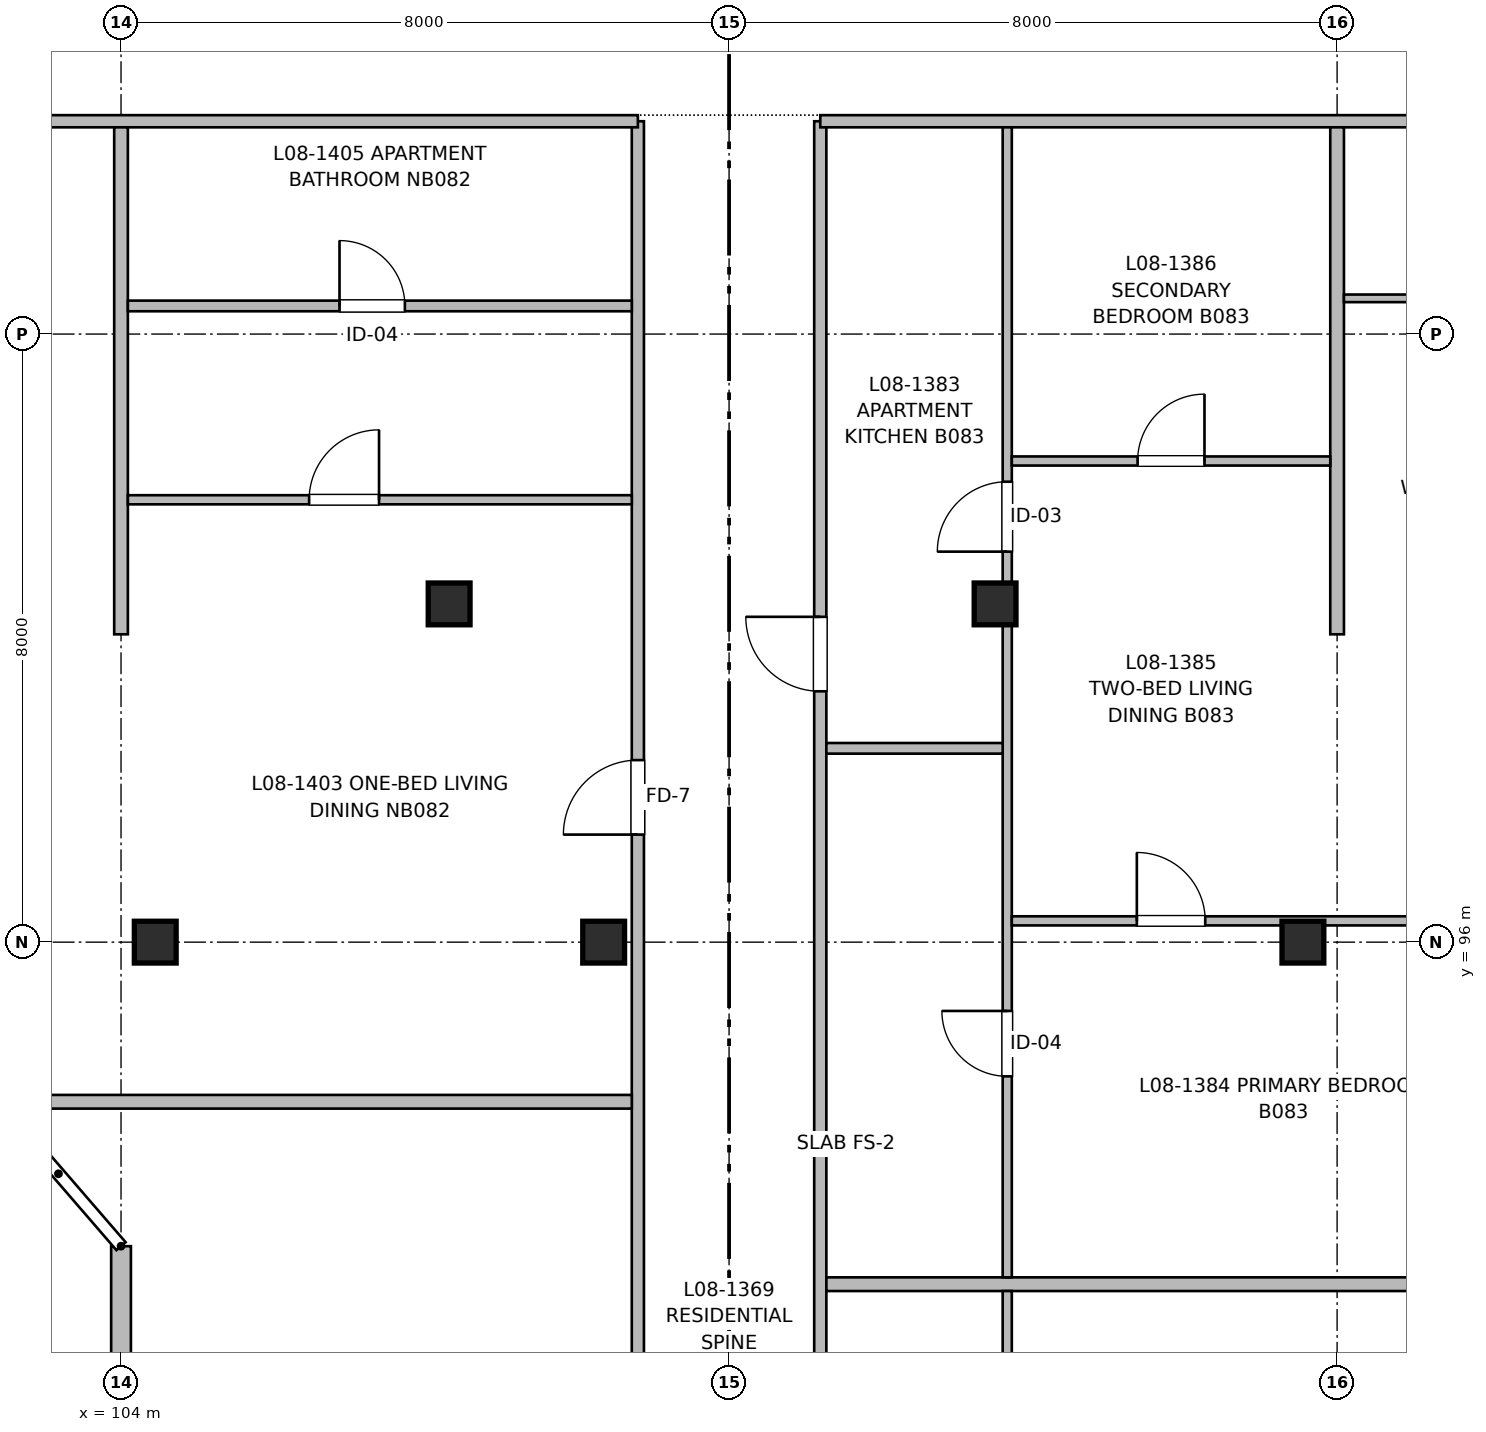
"""IFC4 building model, lengths in metres.
Left out: names, types, materials, properties, quantities, classifications, styles, units other than length and angle.
Written with IfcOpenShell. Run it as: python <this file> out.ifc"""

import sys

from ifc_helpers import new_model, si_unit, direction, frame, frame_2d, origin, origin_2d, place, context, subcontext, project, spatial, rectangle, extrude, element, fill, save


model = new_model("IFC4")
c1 = context("Model", 3, precision=1e-05, world=origin(), true_north=direction((0.0, 1.0)))
c2 = subcontext(c1, "Body", "Model", "MODEL_VIEW")
j1 = project(units=[si_unit("LENGTHUNIT", "METRE"), si_unit("PLANEANGLEUNIT", "RADIAN")], contexts=[c1])
p1 = place(None, origin())
s1 = spatial("IfcSite", under=j1, at=p1, CompositionType="ELEMENT")
p2 = place(p1, origin())
s2 = spatial("IfcBuilding", under=s1, at=p2, CompositionType="ELEMENT")
p3 = place(p2, frame((0.0, 0.0, 26.56)))
s3 = spatial("IfcBuildingStorey", under=s2, at=p3, CompositionType="ELEMENT", Elevation=26.56)
for number, where, z_axis, x_axis in (
    (1, (104.45, 96.0, 0.0), (0.0, 0.0, 1.0), (1.0, 0.0, 0.0)),
    (2, (108.317, 100.45, 0.0), (0.0, 0.0, 1.0), (1.0, 0.0, 0.0)),
    (3, (110.35, 96.0, 0.0), (0.0, 0.0, 1.0), (1.0, 0.0, 0.0)),
    (4, (115.5, 100.45, 0.0), (0.0, 0.0, 1.0), (1.0, 0.0, 0.0)),
    (5, (119.55, 96.0, 0.0), (0.0, 0.0, 1.0), (1.0, 0.0, 0.0)),
):
    element("IfcColumn", number, at=place(p3, frame(where, z_axis=z_axis, x_axis=x_axis)), inside=s3, PredefinedType="COLUMN", context=c2, shape_type="SweptSolid", body=[
        extrude(rectangle(XDim=0.55, YDim=0.55, at=origin_2d()), origin(), (0.0, 0.0, 1.0), 3.2),
    ])
p4 = place(p3, frame((104.0, 59.0, 0.0), z_axis=(0.0, 0.0, 1.0), x_axis=(0.0, 1.0, 0.0)))
e6 = element("IfcWall", 6, at=p4, inside=s3, PredefinedType="SOLIDWALL", context=c2, shape_type="SweptSolid", body=[
    extrude(rectangle(XDim=33.0, YDim=0.26, at=frame_2d((16.5, 0.0))), origin(), (0.0, 0.0, 1.0), 2.98),
])
p5 = place(p4, frame((3.125, 0.0, 0.0)))
e7 = element("IfcOpeningElement", 7, at=p5, cuts=e6, PredefinedType="OPENING", context=c2, shape_type="SweptSolid", body=[
    extrude(rectangle(XDim=1.2, YDim=2.2, at=frame_2d((0.6, 1.1))), frame((0.0, 0.14, 0.0), z_axis=(0.0, -1.0, 0.0), x_axis=(1.0, 0.0, 0.0)), (0.0, 0.0, 1.0), 0.28),
])
p6 = place(p4, frame((5.425, 0.0, 0.62)))
e8 = element("IfcOpeningElement", 8, at=p6, cuts=e6, PredefinedType="OPENING", context=c2, shape_type="SweptSolid", body=[
    extrude(rectangle(XDim=1.1, YDim=1.6, at=frame_2d((0.55, 0.8))), frame((0.0, 0.14, 0.0), z_axis=(0.0, -1.0, 0.0), x_axis=(1.0, 0.0, 0.0)), (0.0, 0.0, 1.0), 0.28),
])
p7 = place(p4, frame((11.175, 0.0, 0.72)))
e9 = element("IfcOpeningElement", 9, at=p7, cuts=e6, PredefinedType="OPENING", context=c2, shape_type="SweptSolid", body=[
    extrude(rectangle(XDim=2.4, YDim=1.5, at=frame_2d((1.2, 0.75))), frame((0.0, 0.14, 0.0), z_axis=(0.0, -1.0, 0.0), x_axis=(1.0, 0.0, 0.0)), (0.0, 0.0, 1.0), 0.28),
])
p8 = place(p4, frame((19.025, 0.0, 0.82)))
e10 = element("IfcOpeningElement", 10, at=p8, cuts=e6, PredefinedType="OPENING", context=c2, shape_type="SweptSolid", body=[
    extrude(rectangle(XDim=1.5, YDim=1.4, at=frame_2d((0.75, 0.7))), frame((0.0, 0.14, 0.0), z_axis=(0.0, -1.0, 0.0), x_axis=(1.0, 0.0, 0.0)), (0.0, 0.0, 1.0), 0.28),
])
p9 = place(p4, frame((28.1, 0.0, 0.82)))
e11 = element("IfcOpeningElement", 11, at=p9, cuts=e6, PredefinedType="OPENING", context=c2, shape_type="SweptSolid", body=[
    extrude(rectangle(XDim=1.55, YDim=1.4, at=frame_2d((0.775, 0.7))), frame((0.0, 0.14, 0.0), z_axis=(0.0, -1.0, 0.0), x_axis=(1.0, 0.0, 0.0)), (0.0, 0.0, 1.0), 0.28),
])
p10 = place(p3, frame((110.8, 59.16, 0.0), z_axis=(0.0, 0.0, 1.0), x_axis=(0.0, 1.0, 0.0)))
e12 = element("IfcWall", 12, at=p10, inside=s3, PredefinedType="PARTITIONING", context=c2, shape_type="SweptSolid", body=[
    extrude(rectangle(XDim=47.64, YDim=0.16, at=frame_2d((23.82, 0.0))), origin(), (0.0, 0.0, 1.0), 2.935),
])
p11 = place(p10, frame((9.84, 0.0, 0.0)))
e13 = element("IfcOpeningElement", 13, at=p11, cuts=e12, PredefinedType="OPENING", context=c2, shape_type="SweptSolid", body=[
    extrude(rectangle(XDim=1.1, YDim=2.15, at=frame_2d((0.55, 1.075))), frame((0.0, 0.09, 0.0), z_axis=(0.0, -1.0, 0.0), x_axis=(1.0, 0.0, 0.0)), (0.0, 0.0, 1.0), 0.18),
])
p12 = place(p10, frame((16.24, 0.0, 0.0)))
e14 = element("IfcOpeningElement", 14, at=p12, cuts=e12, PredefinedType="OPENING", context=c2, shape_type="SweptSolid", body=[
    extrude(rectangle(XDim=1.6, YDim=2.15, at=frame_2d((0.8, 1.075))), frame((0.0, 0.09, 0.0), z_axis=(0.0, -1.0, 0.0), x_axis=(1.0, 0.0, 0.0)), (0.0, 0.0, 1.0), 0.18),
])
p13 = place(p10, frame((1.8, 0.0, 0.0)))
e15 = element("IfcOpeningElement", 15, at=p13, cuts=e12, PredefinedType="OPENING", context=c2, shape_type="SweptSolid", body=[
    extrude(rectangle(XDim=0.96, YDim=2.15, at=frame_2d((0.48, 1.075))), frame((0.0, 0.09, 0.0), z_axis=(0.0, -1.0, 0.0), x_axis=(1.0, 0.0, 0.0)), (0.0, 0.0, 1.0), 0.18),
])
p14 = place(p10, frame((29.645, 0.0, 0.0)))
e16 = element("IfcOpeningElement", 16, at=p14, cuts=e12, PredefinedType="OPENING", context=c2, shape_type="SweptSolid", body=[
    extrude(rectangle(XDim=0.98, YDim=2.15, at=frame_2d((0.49, 1.075))), frame((0.0, 0.09, 0.0), z_axis=(0.0, -1.0, 0.0), x_axis=(1.0, 0.0, 0.0)), (0.0, 0.0, 1.0), 0.18),
])
p15 = place(p10, frame((38.255, 0.0, 0.0)))
e17 = element("IfcOpeningElement", 17, at=p15, cuts=e12, PredefinedType="OPENING", context=c2, shape_type="SweptSolid", body=[
    extrude(rectangle(XDim=0.98, YDim=2.15, at=frame_2d((0.49, 1.075))), frame((0.0, 0.09, 0.0), z_axis=(0.0, -1.0, 0.0), x_axis=(1.0, 0.0, 0.0)), (0.0, 0.0, 1.0), 0.18),
])
p16 = place(p3, frame((113.2, 59.16, 0.0), z_axis=(0.0, 0.0, 1.0), x_axis=(0.0, 1.0, 0.0)))
e18 = element("IfcWall", 18, at=p16, inside=s3, PredefinedType="PARTITIONING", context=c2, shape_type="SweptSolid", body=[
    extrude(rectangle(XDim=47.64, YDim=0.16, at=frame_2d((23.82, 0.0))), origin(), (0.0, 0.0, 1.0), 2.935),
])
p17 = place(p16, frame((8.15, 0.0, 0.0)))
e19 = element("IfcOpeningElement", 19, at=p17, cuts=e18, PredefinedType="OPENING", context=c2, shape_type="SweptSolid", body=[
    extrude(rectangle(XDim=0.98, YDim=2.15, at=frame_2d((0.49, 1.075))), frame((0.0, 0.09, 0.0), z_axis=(0.0, -1.0, 0.0), x_axis=(1.0, 0.0, 0.0)), (0.0, 0.0, 1.0), 0.18),
])
p18 = place(p16, frame((24.37, 0.0, 0.0)))
e20 = element("IfcOpeningElement", 20, at=p18, cuts=e18, PredefinedType="OPENING", context=c2, shape_type="SweptSolid", body=[
    extrude(rectangle(XDim=0.98, YDim=2.15, at=frame_2d((0.49, 1.075))), frame((0.0, 0.09, 0.0), z_axis=(0.0, -1.0, 0.0), x_axis=(1.0, 0.0, 0.0)), (0.0, 0.0, 1.0), 0.18),
])
p19 = place(p16, frame((40.14, 0.0, 0.0)))
e21 = element("IfcOpeningElement", 21, at=p19, cuts=e18, PredefinedType="OPENING", context=c2, shape_type="SweptSolid", body=[
    extrude(rectangle(XDim=0.98, YDim=2.15, at=frame_2d((0.49, 1.075))), frame((0.0, 0.09, 0.0), z_axis=(0.0, -1.0, 0.0), x_axis=(1.0, 0.0, 0.0)), (0.0, 0.0, 1.0), 0.18),
])
p20 = place(p3, frame((93.66, 106.8, 0.0), z_axis=(0.0, 0.0, 1.0), x_axis=(1.0, 0.0, 0.0)))
e22 = element("IfcWall", 22, at=p20, inside=s3, PredefinedType="PARTITIONING", context=c2, shape_type="SweptSolid", body=[
    extrude(rectangle(XDim=17.14, YDim=0.16, at=frame_2d((8.57, 0.0))), origin(), (0.0, 0.0, 1.0), 2.935),
])
p21 = place(p3, frame((113.2, 106.8, 0.0), z_axis=(0.0, 0.0, 1.0), x_axis=(1.0, 0.0, 0.0)))
e23 = element("IfcWall", 23, at=p21, inside=s3, PredefinedType="PARTITIONING", context=c2, shape_type="SweptSolid", body=[
    extrude(rectangle(XDim=24.14, YDim=0.16, at=frame_2d((12.07, 0.0))), origin(), (0.0, 0.0, 1.0), 2.935),
])
p22 = place(p21, frame((19.575, 0.0, 0.0)))
e24 = element("IfcOpeningElement", 24, at=p22, cuts=e23, PredefinedType="OPENING", context=c2, shape_type="SweptSolid", body=[
    extrude(rectangle(XDim=1.05, YDim=2.15, at=frame_2d((0.525, 1.075))), frame((0.0, 0.09, 0.0), z_axis=(0.0, -1.0, 0.0), x_axis=(1.0, 0.0, 0.0)), (0.0, 0.0, 1.0), 0.18),
])
p23 = place(p21, frame((8.995, 0.0, 0.0)))
e25 = element("IfcOpeningElement", 25, at=p23, cuts=e23, PredefinedType="OPENING", context=c2, shape_type="SweptSolid", body=[
    extrude(rectangle(XDim=0.98, YDim=2.15, at=frame_2d((0.49, 1.075))), frame((0.0, 0.09, 0.0), z_axis=(0.0, -1.0, 0.0), x_axis=(1.0, 0.0, 0.0)), (0.0, 0.0, 1.0), 0.18),
])
for number, where, z_axis, x_axis in (
    (26, (120.0, 100.05, 0.0), (0.0, 0.0, 1.0), (0.0, 1.0, 0.0)),
    (27, (104.0, 100.05, 0.0), (0.0, 0.0, 1.0), (0.0, 1.0, 0.0)),
):
    element("IfcWall", number, at=place(p3, frame(where, z_axis=z_axis, x_axis=x_axis)), inside=s3, PredefinedType="PARTITIONING", context=c2, shape_type="SweptSolid", body=[
        extrude(rectangle(XDim=6.67, YDim=0.18, at=frame_2d((3.335, 0.0))), origin(), (0.0, 0.0, 1.0), 2.935),
    ])
p24 = place(p3, frame((113.28, 91.5, 0.0), z_axis=(0.0, 0.0, 1.0), x_axis=(1.0, 0.0, 0.0)))
e28 = element("IfcWall", 28, at=p24, inside=s3, PredefinedType="PARTITIONING", context=c2, shape_type="SweptSolid", body=[
    extrude(rectangle(XDim=9.477, YDim=0.18, at=frame_2d((4.738, 0.0))), origin(), (0.0, 0.0, 1.0), 2.935),
])
p25 = place(p3, frame((115.66, 75.42, 0.0), z_axis=(0.0, 0.0, 1.0), x_axis=(0.0, 1.0, 0.0)))
e29 = element("IfcWall", 29, at=p25, inside=s3, PredefinedType="PARTITIONING", context=c2, shape_type="SweptSolid", body=[
    extrude(rectangle(XDim=15.99, YDim=0.12, at=frame_2d((7.995, 0.0))), origin(), (0.0, 0.0, 1.0), 2.935),
])
p26 = place(p25, frame((2.797, 0.0, 0.0)))
e30 = element("IfcOpeningElement", 30, at=p26, cuts=e29, PredefinedType="OPENING", context=c2, shape_type="SweptSolid", body=[
    extrude(rectangle(XDim=0.86, YDim=2.1, at=frame_2d((0.43, 1.05))), frame((0.0, 0.07, 0.0), z_axis=(0.0, -1.0, 0.0), x_axis=(1.0, 0.0, 0.0)), (0.0, 0.0, 1.0), 0.14),
])
p27 = place(p25, frame((9.776, 0.0, 0.0)))
e31 = element("IfcOpeningElement", 31, at=p27, cuts=e29, PredefinedType="OPENING", context=c2, shape_type="SweptSolid", body=[
    extrude(rectangle(XDim=0.92, YDim=2.1, at=frame_2d((0.46, 1.05))), frame((0.0, 0.07, 0.0), z_axis=(0.0, -1.0, 0.0), x_axis=(1.0, 0.0, 0.0)), (0.0, 0.0, 1.0), 0.14),
])
p28 = place(p3, frame((115.66, 91.59, 0.0), z_axis=(0.0, 0.0, 1.0), x_axis=(0.0, 1.0, 0.0)))
e32 = element("IfcWall", 32, at=p28, inside=s3, PredefinedType="PARTITIONING", context=c2, shape_type="SweptSolid", body=[
    extrude(rectangle(XDim=15.13, YDim=0.12, at=frame_2d((7.565, 0.0))), origin(), (0.0, 0.0, 1.0), 2.68),
])
p29 = place(p28, frame((2.645, 0.0, 0.0)))
e33 = element("IfcOpeningElement", 33, at=p29, cuts=e32, PredefinedType="OPENING", context=c2, shape_type="SweptSolid", body=[
    extrude(rectangle(XDim=0.86, YDim=2.1, at=frame_2d((0.43, 1.05))), frame((0.0, 0.07, 0.0), z_axis=(0.0, -1.0, 0.0), x_axis=(1.0, 0.0, 0.0)), (0.0, 0.0, 1.0), 0.14),
])
p30 = place(p28, frame((9.548, 0.0, 0.0)))
e34 = element("IfcOpeningElement", 34, at=p30, cuts=e32, PredefinedType="OPENING", context=c2, shape_type="SweptSolid", body=[
    extrude(rectangle(XDim=0.92, YDim=2.1, at=frame_2d((0.46, 1.05))), frame((0.0, 0.07, 0.0), z_axis=(0.0, -1.0, 0.0), x_axis=(1.0, 0.0, 0.0)), (0.0, 0.0, 1.0), 0.14),
])
p31 = place(p3, frame((113.28, 98.55, 0.0), z_axis=(0.0, 0.0, 1.0), x_axis=(1.0, 0.0, 0.0)))
e35 = element("IfcWall", 35, at=p31, inside=s3, PredefinedType="PARTITIONING", context=c2, shape_type="SweptSolid", body=[
    extrude(rectangle(XDim=2.32, YDim=0.14, at=frame_2d((1.16, 0.0))), origin(), (0.0, 0.0, 1.0), 2.935),
])
p32 = place(p3, frame((115.72, 96.28, 0.0), z_axis=(0.0, 0.0, 1.0), x_axis=(1.0, 0.0, 0.0)))
e36 = element("IfcWall", 36, at=p32, inside=s3, PredefinedType="PARTITIONING", context=c2, shape_type="SweptSolid", body=[
    extrude(rectangle(XDim=11.627, YDim=0.12, at=frame_2d((5.814, 0.0))), origin(), (0.0, 0.0, 1.0), 2.935),
])
p33 = place(p32, frame((1.645, 0.0, 0.0)))
e37 = element("IfcOpeningElement", 37, at=p33, cuts=e36, PredefinedType="OPENING", context=c2, shape_type="SweptSolid", body=[
    extrude(rectangle(XDim=0.9, YDim=2.1, at=frame_2d((0.45, 1.05))), frame((0.0, 0.07, 0.0), z_axis=(0.0, -1.0, 0.0), x_axis=(1.0, 0.0, 0.0)), (0.0, 0.0, 1.0), 0.14),
])
p34 = place(p3, frame((115.72, 102.33, 0.0), z_axis=(0.0, 0.0, 1.0), x_axis=(1.0, 0.0, 0.0)))
e38 = element("IfcWall", 38, at=p34, inside=s3, PredefinedType="PARTITIONING", context=c2, shape_type="SweptSolid", body=[
    extrude(rectangle(XDim=4.19, YDim=0.12, at=frame_2d((2.095, 0.0))), origin(), (0.0, 0.0, 1.0), 2.935),
])
p35 = place(p34, frame((1.655, 0.0, 0.0)))
e39 = element("IfcOpeningElement", 39, at=p35, cuts=e38, PredefinedType="OPENING", context=c2, shape_type="SweptSolid", body=[
    extrude(rectangle(XDim=0.88, YDim=2.1, at=frame_2d((0.44, 1.05))), frame((0.0, 0.07, 0.0), z_axis=(0.0, -1.0, 0.0), x_axis=(1.0, 0.0, 0.0)), (0.0, 0.0, 1.0), 0.14),
])
p36 = place(p3, frame((120.09, 104.47, 0.0), z_axis=(0.0, 0.0, 1.0), x_axis=(1.0, 0.0, 0.0)))
e40 = element("IfcWall", 40, at=p36, inside=s3, PredefinedType="PARTITIONING", context=c2, shape_type="SweptSolid", body=[
    extrude(rectangle(XDim=5.13, YDim=0.1, at=frame_2d((2.565, 0.0))), origin(), (0.0, 0.0, 1.0), 2.935),
])
p37 = place(p36, frame((2.18, 0.0, 0.0)))
e41 = element("IfcOpeningElement", 41, at=p37, cuts=e40, PredefinedType="OPENING", context=c2, shape_type="SweptSolid", body=[
    extrude(rectangle(XDim=0.92, YDim=2.1, at=frame_2d((0.46, 1.05))), frame((0.0, 0.06, 0.0), z_axis=(0.0, -1.0, 0.0), x_axis=(1.0, 0.0, 0.0)), (0.0, 0.0, 1.0), 0.12),
])
p38 = place(p3, frame((102.411, 93.9, 0.0), z_axis=(0.0, 0.0, 1.0), x_axis=(1.0, 0.0, 0.0)))
e42 = element("IfcWall", 42, at=p38, inside=s3, PredefinedType="PARTITIONING", context=c2, shape_type="SweptSolid", body=[
    extrude(rectangle(XDim=8.309, YDim=0.18, at=frame_2d((4.155, 0.0))), origin(), (0.0, 0.0, 1.0), 2.935),
])
p39 = place(p3, frame((104.09, 101.82, 0.0), z_axis=(0.0, 0.0, 1.0), x_axis=(1.0, 0.0, 0.0)))
e43 = element("IfcWall", 43, at=p39, inside=s3, PredefinedType="PARTITIONING", context=c2, shape_type="SweptSolid", body=[
    extrude(rectangle(XDim=6.63, YDim=0.12, at=frame_2d((3.315, 0.0))), origin(), (0.0, 0.0, 1.0), 2.935),
])
p40 = place(p39, frame((2.385, 0.0, 0.0)))
e44 = element("IfcOpeningElement", 44, at=p40, cuts=e43, PredefinedType="OPENING", context=c2, shape_type="SweptSolid", body=[
    extrude(rectangle(XDim=0.92, YDim=2.1, at=frame_2d((0.46, 1.05))), frame((0.0, 0.07, 0.0), z_axis=(0.0, -1.0, 0.0), x_axis=(1.0, 0.0, 0.0)), (0.0, 0.0, 1.0), 0.14),
])
p41 = place(p3, frame((104.09, 104.37, 0.0), z_axis=(0.0, 0.0, 1.0), x_axis=(1.0, 0.0, 0.0)))
e45 = element("IfcWall", 45, at=p41, inside=s3, PredefinedType="PARTITIONING", context=c2, shape_type="SweptSolid", body=[
    extrude(rectangle(XDim=6.63, YDim=0.14, at=frame_2d((3.315, 0.0))), origin(), (0.0, 0.0, 1.0), 2.935),
])
p42 = place(p41, frame((2.785, 0.0, 0.0)))
e46 = element("IfcOpeningElement", 46, at=p42, cuts=e45, PredefinedType="OPENING", context=c2, shape_type="SweptSolid", body=[
    extrude(rectangle(XDim=0.86, YDim=2.1, at=frame_2d((0.43, 1.05))), frame((0.0, 0.08, 0.0), z_axis=(0.0, -1.0, 0.0), x_axis=(1.0, 0.0, 0.0)), (0.0, 0.0, 1.0), 0.16),
])
p43 = place(p29, origin())
e47 = element("IfcDoor", 47, at=p43, inside=s3, OperationType="SINGLE_SWING_RIGHT", PredefinedType="DOOR", context=c2, shape_type="SweptSolid", body=[
    extrude(rectangle(XDim=0.86, YDim=2.1, at=frame_2d((0.43, 1.05))), frame((0.0, 0.025, 0.0), z_axis=(0.0, -1.0, 0.0), x_axis=(1.0, 0.0, 0.0)), (0.0, 0.0, 1.0), 0.05),
])
fill(e33, e47)
p44 = place(p30, origin())
e48 = element("IfcDoor", 48, at=p44, inside=s3, OperationType="SINGLE_SWING_LEFT", PredefinedType="DOOR", context=c2, shape_type="SweptSolid", body=[
    extrude(rectangle(XDim=0.92, YDim=2.1, at=frame_2d((0.46, 1.05))), frame((0.0, 0.025, 0.0), z_axis=(0.0, -1.0, 0.0), x_axis=(1.0, 0.0, 0.0)), (0.0, 0.0, 1.0), 0.05),
])
fill(e34, e48)
p45 = place(p19, origin())
e49 = element("IfcDoor", 49, at=p45, inside=s3, OperationType="SINGLE_SWING_RIGHT", PredefinedType="DOOR", context=c2, shape_type="SweptSolid", body=[
    extrude(rectangle(XDim=0.98, YDim=2.15, at=frame_2d((0.49, 1.075))), frame((0.0, 0.025, 0.0), z_axis=(0.0, -1.0, 0.0), x_axis=(1.0, 0.0, 0.0)), (0.0, 0.0, 1.0), 0.05),
])
fill(e21, e49)
p46 = place(p33, origin())
e50 = element("IfcDoor", 50, at=p46, inside=s3, OperationType="SINGLE_SWING_LEFT", PredefinedType="DOOR", context=c2, shape_type="SweptSolid", body=[
    extrude(rectangle(XDim=0.9, YDim=2.1, at=frame_2d((0.45, 1.05))), frame((0.0, 0.025, 0.0), z_axis=(0.0, -1.0, 0.0), x_axis=(1.0, 0.0, 0.0)), (0.0, 0.0, 1.0), 0.05),
])
fill(e37, e50)
p47 = place(p35, origin())
e51 = element("IfcDoor", 51, at=p47, inside=s3, OperationType="SINGLE_SWING_RIGHT", PredefinedType="DOOR", context=c2, shape_type="SweptSolid", body=[
    extrude(rectangle(XDim=0.88, YDim=2.1, at=frame_2d((0.44, 1.05))), frame((0.0, 0.025, 0.0), z_axis=(0.0, -1.0, 0.0), x_axis=(1.0, 0.0, 0.0)), (0.0, 0.0, 1.0), 0.05),
])
fill(e39, e51)
p48 = place(p42, origin())
e52 = element("IfcDoor", 52, at=p48, inside=s3, OperationType="SINGLE_SWING_LEFT", PredefinedType="DOOR", context=c2, shape_type="SweptSolid", body=[
    extrude(rectangle(XDim=0.86, YDim=2.1, at=frame_2d((0.43, 1.05))), frame((0.0, 0.025, 0.0), z_axis=(0.0, -1.0, 0.0), x_axis=(1.0, 0.0, 0.0)), (0.0, 0.0, 1.0), 0.05),
])
fill(e46, e52)
p49 = place(p40, origin())
e53 = element("IfcDoor", 53, at=p49, inside=s3, OperationType="SINGLE_SWING_RIGHT", PredefinedType="DOOR", context=c2, shape_type="SweptSolid", body=[
    extrude(rectangle(XDim=0.92, YDim=2.1, at=frame_2d((0.46, 1.05))), frame((0.0, 0.025, 0.0), z_axis=(0.0, -1.0, 0.0), x_axis=(1.0, 0.0, 0.0)), (0.0, 0.0, 1.0), 0.05),
])
fill(e44, e53)
p50 = place(p15, origin())
e54 = element("IfcDoor", 54, at=p50, inside=s3, OperationType="SINGLE_SWING_LEFT", PredefinedType="DOOR", context=c2, shape_type="SweptSolid", body=[
    extrude(rectangle(XDim=0.98, YDim=2.15, at=frame_2d((0.49, 1.075))), frame((0.0, 0.025, 0.0), z_axis=(0.0, -1.0, 0.0), x_axis=(1.0, 0.0, 0.0)), (0.0, 0.0, 1.0), 0.05),
])
fill(e17, e54)
save(model, sys.argv[1])
